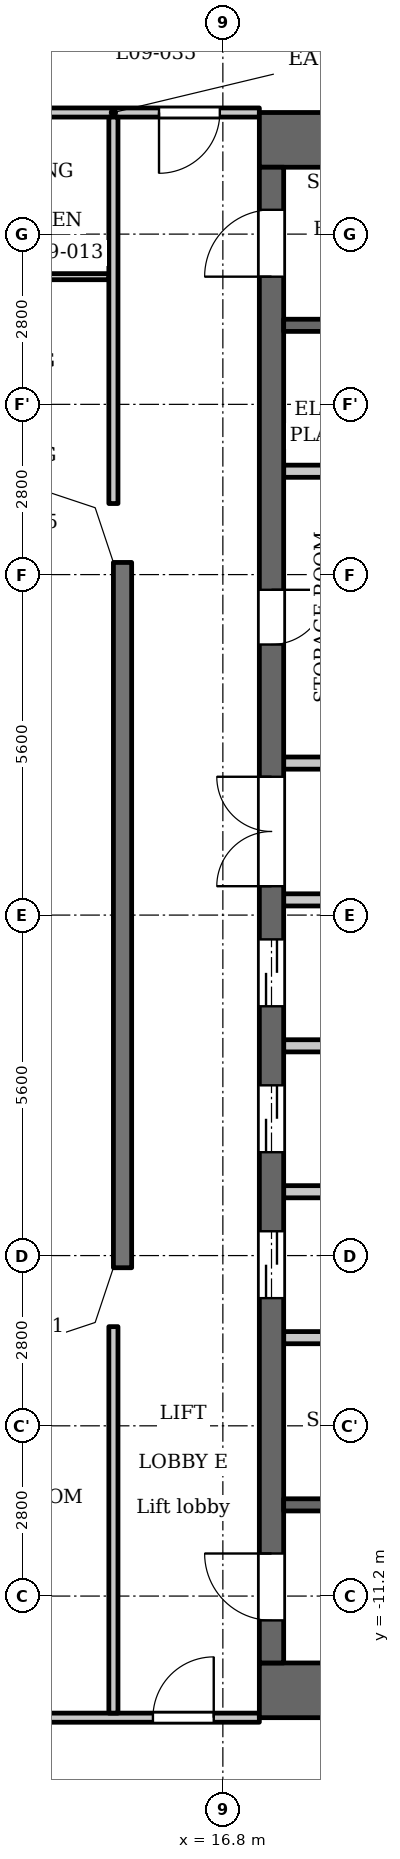
"""IFC4 building model, lengths in metres.
Left out: names, types, materials, properties, quantities, classifications, styles, units other than length and angle.
Written with IfcOpenShell. Run it as: python <this file> out.ifc"""

import sys

from ifc_helpers import new_model, si_unit, direction, frame, frame_2d, origin, place, context, subcontext, project, spatial, polyline, rectangle, outline, extrude, element, fill, save


model = new_model("IFC4")
c1 = context("Model", 3, precision=1e-05, world=origin(), true_north=direction((0.0, 1.0)))
c2 = subcontext(c1, "Body", "Model", "MODEL_VIEW")
j1 = project(units=[si_unit("LENGTHUNIT", "METRE"), si_unit("PLANEANGLEUNIT", "RADIAN")], contexts=[c1])
p1 = place(None, origin())
s1 = spatial("IfcSite", under=j1, at=p1, CompositionType="ELEMENT")
p2 = place(p1, origin())
s2 = spatial("IfcBuilding", under=s1, at=p2, CompositionType="ELEMENT")
p3 = place(p2, frame((0.0, 0.0, 41.0)))
s3 = spatial("IfcBuildingStorey", under=s2, at=p3, CompositionType="ELEMENT", Elevation=41.0)
p4 = place(p3, frame((15.15, 5.8, 0.0), z_axis=(0.0, 0.0, 1.0), x_axis=(0.0, -1.0, 0.0)))
e1 = element("IfcWall", 1, at=p4, inside=s3, PredefinedType="SOLIDWALL", context=c2, shape_type="SweptSolid", body=[
    extrude(rectangle(XDim=11.6, YDim=0.3, at=frame_2d((5.8, 0.0))), origin(), (0.0, 0.0, 1.0), 3.2),
])
for number, where, z_axis, x_axis in (
    (2, (17.4, 12.75, 0.0), (0.0, 0.0, 1.0), (1.0, 0.0, 0.0)),
    (3, (17.4, -12.75, 0.0), (0.0, 0.0, 1.0), (1.0, 0.0, 0.0)),
):
    element("IfcWall", number, at=place(p3, frame(where, z_axis=z_axis, x_axis=x_axis)), inside=s3, PredefinedType="SHEAR", context=c2, shape_type="SweptSolid", body=[
        extrude(rectangle(XDim=10.4, YDim=0.9, at=frame_2d((5.2, 0.0))), origin(), (0.0, 0.0, 1.0), 3.2),
    ])
p5 = place(p3, frame((17.6, -12.3, 0.0), z_axis=(0.0, 0.0, 1.0), x_axis=(0.0, 1.0, 0.0)))
e4 = element("IfcWall", 4, at=p5, inside=s3, PredefinedType="SHEAR", context=c2, shape_type="SweptSolid", body=[
    extrude(rectangle(XDim=24.6, YDim=0.4, at=frame_2d((12.3, 0.0))), origin(), (0.0, 0.0, 1.0), 3.2),
])
p6 = place(p5, frame((6.0, 0.0, 0.0)))
e5 = element("IfcOpeningElement", 5, at=p6, cuts=e4, PredefinedType="OPENING", context=c2, shape_type="SweptSolid", body=[
    extrude(rectangle(XDim=1.1, YDim=2.1, at=frame_2d((0.55, 1.05))), frame((0.0, 0.21, 0.0), z_axis=(0.0, -1.0, 0.0), x_axis=(1.0, 0.0, 0.0)), (0.0, 0.0, 1.0), 0.42),
])
p7 = place(p5, frame((8.4, 0.0, 0.0)))
e6 = element("IfcOpeningElement", 6, at=p7, cuts=e4, PredefinedType="OPENING", context=c2, shape_type="SweptSolid", body=[
    extrude(rectangle(XDim=1.1, YDim=2.1, at=frame_2d((0.55, 1.05))), frame((0.0, 0.21, 0.0), z_axis=(0.0, -1.0, 0.0), x_axis=(1.0, 0.0, 0.0)), (0.0, 0.0, 1.0), 0.42),
])
p8 = place(p5, frame((10.8, 0.0, 0.0)))
e7 = element("IfcOpeningElement", 7, at=p8, cuts=e4, PredefinedType="OPENING", context=c2, shape_type="SweptSolid", body=[
    extrude(rectangle(XDim=1.1, YDim=2.1, at=frame_2d((0.55, 1.05))), frame((0.0, 0.21, 0.0), z_axis=(0.0, -1.0, 0.0), x_axis=(1.0, 0.0, 0.0)), (0.0, 0.0, 1.0), 0.42),
])
p9 = place(p5, frame((16.75, 0.0, 0.0)))
e8 = element("IfcOpeningElement", 8, at=p9, cuts=e4, PredefinedType="OPENING", context=c2, shape_type="SweptSolid", body=[
    extrude(rectangle(XDim=0.9, YDim=2.1, at=frame_2d((0.45, 1.05))), frame((0.0, 0.21, 0.0), z_axis=(0.0, -1.0, 0.0), x_axis=(1.0, 0.0, 0.0)), (0.0, 0.0, 1.0), 0.42),
])
p10 = place(p5, frame((22.8, 0.0, 0.0)))
e9 = element("IfcOpeningElement", 9, at=p10, cuts=e4, PredefinedType="OPENING", context=c2, shape_type="SweptSolid", body=[
    extrude(rectangle(XDim=1.1, YDim=2.1, at=frame_2d((0.55, 1.05))), frame((0.0, 0.21, 0.0), z_axis=(0.0, -1.0, 0.0), x_axis=(1.0, 0.0, 0.0)), (0.0, 0.0, 1.0), 0.42),
])
p11 = place(p5, frame((0.7, 0.0, 0.0)))
e10 = element("IfcOpeningElement", 10, at=p11, cuts=e4, PredefinedType="OPENING", context=c2, shape_type="SweptSolid", body=[
    extrude(rectangle(XDim=1.1, YDim=2.1, at=frame_2d((0.55, 1.05))), frame((0.0, 0.21, 0.0), z_axis=(0.0, -1.0, 0.0), x_axis=(1.0, 0.0, 0.0)), (0.0, 0.0, 1.0), 0.42),
])
p12 = place(p5, frame((12.775, 0.0, 0.0)))
e11 = element("IfcOpeningElement", 11, at=p12, cuts=e4, PredefinedType="OPENING", context=c2, shape_type="SweptSolid", body=[
    extrude(rectangle(XDim=1.8, YDim=2.1, at=frame_2d((0.9, 1.05))), frame((0.0, 0.21, 0.0), z_axis=(0.0, -1.0, 0.0), x_axis=(1.0, 0.0, 0.0)), (0.0, 0.0, 1.0), 0.42),
])
p13 = place(p3, frame((17.8, -9.7, 0.0), z_axis=(0.0, 0.0, 1.0), x_axis=(1.0, 0.0, 0.0)))
e12 = element("IfcWall", 12, at=p13, inside=s3, PredefinedType="SHEAR", context=c2, shape_type="SweptSolid", body=[
    extrude(rectangle(XDim=8.3, YDim=0.2, at=frame_2d((4.15, 0.0))), origin(), (0.0, 0.0, 1.0), 3.2),
])
p14 = place(p13, frame((0.85, 0.0, 0.0)))
e13 = element("IfcOpeningElement", 13, at=p14, cuts=e12, PredefinedType="OPENING", context=c2, shape_type="SweptSolid", body=[
    extrude(rectangle(XDim=1.1, YDim=2.1, at=frame_2d((0.55, 1.05))), frame((0.0, 0.11, 0.0), z_axis=(0.0, -1.0, 0.0), x_axis=(1.0, 0.0, 0.0)), (0.0, 0.0, 1.0), 0.22),
])
p15 = place(p13, frame((3.75, 0.0, 0.0)))
e14 = element("IfcOpeningElement", 14, at=p15, cuts=e12, PredefinedType="OPENING", context=c2, shape_type="SweptSolid", body=[
    extrude(rectangle(XDim=1.1, YDim=2.1, at=frame_2d((0.55, 1.05))), frame((0.0, 0.11, 0.0), z_axis=(0.0, -1.0, 0.0), x_axis=(1.0, 0.0, 0.0)), (0.0, 0.0, 1.0), 0.22),
])
for number, where, z_axis, x_axis in (
    (15, (17.8, -6.95, 0.0), (0.0, 0.0, 1.0), (1.0, 0.0, 0.0)),
    (16, (17.8, -4.55, 0.0), (0.0, 0.0, 1.0), (1.0, 0.0, 0.0)),
    (17, (17.8, -2.15, 0.0), (0.0, 0.0, 1.0), (1.0, 0.0, 0.0)),
):
    element("IfcWall", number, at=place(p3, frame(where, z_axis=z_axis, x_axis=x_axis)), inside=s3, PredefinedType="PARTITIONING", context=c2, shape_type="SweptSolid", body=[
        extrude(rectangle(XDim=2.8, YDim=0.2, at=frame_2d((1.4, 0.0))), origin(), (0.0, 0.0, 1.0), 3.2),
    ])
p16 = place(p3, frame((17.8, 0.25, 0.0), z_axis=(0.0, 0.0, 1.0), x_axis=(1.0, 0.0, 0.0)))
e18 = element("IfcWall", 18, at=p16, inside=s3, PredefinedType="PARTITIONING", context=c2, shape_type="SweptSolid", body=[
    extrude(rectangle(XDim=3.0, YDim=0.2, at=frame_2d((1.5, 0.0))), origin(), (0.0, 0.0, 1.0), 3.2),
])
p17 = place(p3, frame((17.8, 2.5, 0.0), z_axis=(0.0, 0.0, 1.0), x_axis=(1.0, 0.0, 0.0)))
e19 = element("IfcWall", 19, at=p17, inside=s3, PredefinedType="PARTITIONING", context=c2, shape_type="SweptSolid", body=[
    extrude(rectangle(XDim=3.0, YDim=0.2, at=frame_2d((1.5, 0.0))), origin(), (0.0, 0.0, 1.0), 3.2),
])
p18 = place(p17, frame((1.7, 0.0, 0.0)))
e20 = element("IfcOpeningElement", 20, at=p18, cuts=e19, PredefinedType="OPENING", context=c2, shape_type="SweptSolid", body=[
    extrude(rectangle(XDim=0.9, YDim=2.1, at=frame_2d((0.45, 1.05))), frame((0.0, 0.11, 0.0), z_axis=(0.0, -1.0, 0.0), x_axis=(1.0, 0.0, 0.0)), (0.0, 0.0, 1.0), 0.22),
])
p19 = place(p3, frame((17.8, 7.3, 0.0), z_axis=(0.0, 0.0, 1.0), x_axis=(1.0, 0.0, 0.0)))
e21 = element("IfcWall", 21, at=p19, inside=s3, PredefinedType="PARTITIONING", context=c2, shape_type="SweptSolid", body=[
    extrude(rectangle(XDim=2.8, YDim=0.2, at=frame_2d((1.4, 0.0))), origin(), (0.0, 0.0, 1.0), 3.2),
])
p20 = place(p3, frame((17.8, 9.7, 0.0), z_axis=(0.0, 0.0, 1.0), x_axis=(1.0, 0.0, 0.0)))
e22 = element("IfcWall", 22, at=p20, inside=s3, PredefinedType="SHEAR", context=c2, shape_type="SweptSolid", body=[
    extrude(rectangle(XDim=8.3, YDim=0.2, at=frame_2d((4.15, 0.0))), origin(), (0.0, 0.0, 1.0), 3.2),
])
p21 = place(p20, frame((0.85, 0.0, 0.0)))
e23 = element("IfcOpeningElement", 23, at=p21, cuts=e22, PredefinedType="OPENING", context=c2, shape_type="SweptSolid", body=[
    extrude(rectangle(XDim=1.1, YDim=2.1, at=frame_2d((0.55, 1.05))), frame((0.0, 0.11, 0.0), z_axis=(0.0, -1.0, 0.0), x_axis=(1.0, 0.0, 0.0)), (0.0, 0.0, 1.0), 0.22),
])
p22 = place(p20, frame((3.75, 0.0, 0.0)))
e24 = element("IfcOpeningElement", 24, at=p22, cuts=e22, PredefinedType="OPENING", context=c2, shape_type="SweptSolid", body=[
    extrude(rectangle(XDim=1.1, YDim=2.1, at=frame_2d((0.55, 1.05))), frame((0.0, 0.11, 0.0), z_axis=(0.0, -1.0, 0.0), x_axis=(1.0, 0.0, 0.0)), (0.0, 0.0, 1.0), 0.22),
])
p23 = place(p3, frame((-17.4, -13.2, 0.0), z_axis=(0.0, 0.0, 1.0), x_axis=(1.0, 0.0, 0.0)))
e25 = element("IfcWall", 25, at=p23, inside=s3, PredefinedType="PARTITIONING", context=c2, shape_type="SweptSolid", body=[
    extrude(rectangle(XDim=34.8, YDim=0.15, at=frame_2d((17.4, 0.0))), origin(), (0.0, 0.0, 1.0), 3.2),
])
p24 = place(p23, frame((0.65, 0.0, 0.0)))
e26 = element("IfcOpeningElement", 26, at=p24, cuts=e25, PredefinedType="OPENING", context=c2, shape_type="SweptSolid", body=[
    extrude(rectangle(XDim=1.0, YDim=2.1, at=frame_2d((0.5, 1.05))), frame((0.0, 0.085, 0.0), z_axis=(0.0, -1.0, 0.0), x_axis=(1.0, 0.0, 0.0)), (0.0, 0.0, 1.0), 0.17),
])
p25 = place(p23, frame((33.05, 0.0, 0.0)))
e27 = element("IfcOpeningElement", 27, at=p25, cuts=e25, PredefinedType="OPENING", context=c2, shape_type="SweptSolid", body=[
    extrude(rectangle(XDim=1.0, YDim=2.1, at=frame_2d((0.5, 1.05))), frame((0.0, 0.085, 0.0), z_axis=(0.0, -1.0, 0.0), x_axis=(1.0, 0.0, 0.0)), (0.0, 0.0, 1.0), 0.17),
])
p26 = place(p23, frame((4.55, 0.0, 0.0)))
e28 = element("IfcOpeningElement", 28, at=p26, cuts=e25, PredefinedType="OPENING", context=c2, shape_type="SweptSolid", body=[
    extrude(rectangle(XDim=1.0, YDim=2.1, at=frame_2d((0.5, 1.05))), frame((0.0, 0.085, 0.0), z_axis=(0.0, -1.0, 0.0), x_axis=(1.0, 0.0, 0.0)), (0.0, 0.0, 1.0), 0.17),
])
p27 = place(p23, frame((6.9, 0.0, 0.0)))
e29 = element("IfcOpeningElement", 29, at=p27, cuts=e25, PredefinedType="OPENING", context=c2, shape_type="SweptSolid", body=[
    extrude(rectangle(XDim=1.0, YDim=2.1, at=frame_2d((0.5, 1.05))), frame((0.0, 0.085, 0.0), z_axis=(0.0, -1.0, 0.0), x_axis=(1.0, 0.0, 0.0)), (0.0, 0.0, 1.0), 0.17),
])
p28 = place(p23, frame((15.75, 0.0, 0.0)))
e30 = element("IfcOpeningElement", 30, at=p28, cuts=e25, PredefinedType="OPENING", context=c2, shape_type="SweptSolid", body=[
    extrude(rectangle(XDim=1.0, YDim=2.1, at=frame_2d((0.5, 1.05))), frame((0.0, 0.085, 0.0), z_axis=(0.0, -1.0, 0.0), x_axis=(1.0, 0.0, 0.0)), (0.0, 0.0, 1.0), 0.17),
])
p29 = place(p23, frame((18.1, 0.0, 0.0)))
e31 = element("IfcOpeningElement", 31, at=p29, cuts=e25, PredefinedType="OPENING", context=c2, shape_type="SweptSolid", body=[
    extrude(rectangle(XDim=1.0, YDim=2.1, at=frame_2d((0.5, 1.05))), frame((0.0, 0.085, 0.0), z_axis=(0.0, -1.0, 0.0), x_axis=(1.0, 0.0, 0.0)), (0.0, 0.0, 1.0), 0.17),
])
p30 = place(p23, frame((26.95, 0.0, 0.0)))
e32 = element("IfcOpeningElement", 32, at=p30, cuts=e25, PredefinedType="OPENING", context=c2, shape_type="SweptSolid", body=[
    extrude(rectangle(XDim=1.0, YDim=2.1, at=frame_2d((0.5, 1.05))), frame((0.0, 0.085, 0.0), z_axis=(0.0, -1.0, 0.0), x_axis=(1.0, 0.0, 0.0)), (0.0, 0.0, 1.0), 0.17),
])
p31 = place(p23, frame((29.25, 0.0, 0.0)))
e33 = element("IfcOpeningElement", 33, at=p31, cuts=e25, PredefinedType="OPENING", context=c2, shape_type="SweptSolid", body=[
    extrude(rectangle(XDim=1.0, YDim=2.1, at=frame_2d((0.5, 1.05))), frame((0.0, 0.085, 0.0), z_axis=(0.0, -1.0, 0.0), x_axis=(1.0, 0.0, 0.0)), (0.0, 0.0, 1.0), 0.17),
])
p32 = place(p3, frame((-14.925, 10.5, 0.0), z_axis=(0.0, 0.0, 1.0), x_axis=(1.0, 0.0, 0.0)))
e34 = element("IfcWall", 34, at=p32, inside=s3, PredefinedType="PARTITIONING", context=c2, shape_type="SweptSolid", body=[
    extrude(rectangle(XDim=29.85, YDim=0.1, at=frame_2d((14.925, 0.0))), origin(), (0.0, 0.0, 1.0), 3.2),
])
p33 = place(p32, frame((4.375, 0.0, 0.0)))
e35 = element("IfcOpeningElement", 35, at=p33, cuts=e34, PredefinedType="OPENING", context=c2, shape_type="SweptSolid", body=[
    extrude(rectangle(XDim=0.8, YDim=2.1, at=frame_2d((0.4, 1.05))), frame((0.0, 0.06, 0.0), z_axis=(0.0, -1.0, 0.0), x_axis=(1.0, 0.0, 0.0)), (0.0, 0.0, 1.0), 0.12),
])
p34 = place(p32, frame((0.575, 0.0, 0.0)))
e36 = element("IfcOpeningElement", 36, at=p34, cuts=e34, PredefinedType="OPENING", context=c2, shape_type="SweptSolid", body=[
    extrude(rectangle(XDim=0.9, YDim=2.1, at=frame_2d((0.45, 1.05))), frame((0.0, 0.06, 0.0), z_axis=(0.0, -1.0, 0.0), x_axis=(1.0, 0.0, 0.0)), (0.0, 0.0, 1.0), 0.12),
])
p35 = place(p32, frame((13.475, 0.0, 0.0)))
e37 = element("IfcOpeningElement", 37, at=p35, cuts=e34, PredefinedType="OPENING", context=c2, shape_type="SweptSolid", body=[
    extrude(rectangle(XDim=0.8, YDim=2.1, at=frame_2d((0.4, 1.05))), frame((0.0, 0.06, 0.0), z_axis=(0.0, -1.0, 0.0), x_axis=(1.0, 0.0, 0.0)), (0.0, 0.0, 1.0), 0.12),
])
p36 = place(p32, frame((9.975, 0.0, 0.0)))
e38 = element("IfcOpeningElement", 38, at=p36, cuts=e34, PredefinedType="OPENING", context=c2, shape_type="SweptSolid", body=[
    extrude(rectangle(XDim=0.9, YDim=2.1, at=frame_2d((0.45, 1.05))), frame((0.0, 0.06, 0.0), z_axis=(0.0, -1.0, 0.0), x_axis=(1.0, 0.0, 0.0)), (0.0, 0.0, 1.0), 0.12),
])
p37 = place(p32, frame((19.075, 0.0, 0.0)))
e39 = element("IfcOpeningElement", 39, at=p37, cuts=e34, PredefinedType="OPENING", context=c2, shape_type="SweptSolid", body=[
    extrude(rectangle(XDim=0.8, YDim=2.1, at=frame_2d((0.4, 1.05))), frame((0.0, 0.06, 0.0), z_axis=(0.0, -1.0, 0.0), x_axis=(1.0, 0.0, 0.0)), (0.0, 0.0, 1.0), 0.12),
])
p38 = place(p32, frame((16.075, 0.0, 0.0)))
e40 = element("IfcOpeningElement", 40, at=p38, cuts=e34, PredefinedType="OPENING", context=c2, shape_type="SweptSolid", body=[
    extrude(rectangle(XDim=0.9, YDim=2.1, at=frame_2d((0.45, 1.05))), frame((0.0, 0.06, 0.0), z_axis=(0.0, -1.0, 0.0), x_axis=(1.0, 0.0, 0.0)), (0.0, 0.0, 1.0), 0.12),
])
p39 = place(p32, frame((21.175, 0.0, 0.0)))
e41 = element("IfcOpeningElement", 41, at=p39, cuts=e34, PredefinedType="OPENING", context=c2, shape_type="SweptSolid", body=[
    extrude(rectangle(XDim=0.8, YDim=2.1, at=frame_2d((0.4, 1.05))), frame((0.0, 0.06, 0.0), z_axis=(0.0, -1.0, 0.0), x_axis=(1.0, 0.0, 0.0)), (0.0, 0.0, 1.0), 0.12),
])
p40 = place(p32, frame((26.775, 0.0, 0.0)))
e42 = element("IfcOpeningElement", 42, at=p40, cuts=e34, PredefinedType="OPENING", context=c2, shape_type="SweptSolid", body=[
    extrude(rectangle(XDim=0.9, YDim=2.1, at=frame_2d((0.45, 1.05))), frame((0.0, 0.06, 0.0), z_axis=(0.0, -1.0, 0.0), x_axis=(1.0, 0.0, 0.0)), (0.0, 0.0, 1.0), 0.12),
])
p41 = place(p3, frame((-17.4, 13.2, 0.0), z_axis=(0.0, 0.0, 1.0), x_axis=(1.0, 0.0, 0.0)))
e43 = element("IfcWall", 43, at=p41, inside=s3, PredefinedType="PARTITIONING", context=c2, shape_type="SweptSolid", body=[
    extrude(rectangle(XDim=34.8, YDim=0.15, at=frame_2d((17.4, 0.0))), origin(), (0.0, 0.0, 1.0), 3.2),
])
p42 = place(p41, frame((0.75, 0.0, 0.0)))
e44 = element("IfcOpeningElement", 44, at=p42, cuts=e43, PredefinedType="OPENING", context=c2, shape_type="SweptSolid", body=[
    extrude(rectangle(XDim=1.0, YDim=2.1, at=frame_2d((0.5, 1.05))), frame((0.0, 0.085, 0.0), z_axis=(0.0, -1.0, 0.0), x_axis=(1.0, 0.0, 0.0)), (0.0, 0.0, 1.0), 0.17),
])
p43 = place(p41, frame((33.15, 0.0, 0.0)))
e45 = element("IfcOpeningElement", 45, at=p43, cuts=e43, PredefinedType="OPENING", context=c2, shape_type="SweptSolid", body=[
    extrude(rectangle(XDim=1.0, YDim=2.1, at=frame_2d((0.5, 1.05))), frame((0.0, 0.085, 0.0), z_axis=(0.0, -1.0, 0.0), x_axis=(1.0, 0.0, 0.0)), (0.0, 0.0, 1.0), 0.17),
])
p44 = place(p41, frame((3.05, 0.0, 0.0)))
e46 = element("IfcOpeningElement", 46, at=p44, cuts=e43, PredefinedType="OPENING", context=c2, shape_type="SweptSolid", body=[
    extrude(rectangle(XDim=1.0, YDim=2.1, at=frame_2d((0.5, 1.05))), frame((0.0, 0.085, 0.0), z_axis=(0.0, -1.0, 0.0), x_axis=(1.0, 0.0, 0.0)), (0.0, 0.0, 1.0), 0.17),
])
p45 = place(p41, frame((12.45, 0.0, 0.0)))
e47 = element("IfcOpeningElement", 47, at=p45, cuts=e43, PredefinedType="OPENING", context=c2, shape_type="SweptSolid", body=[
    extrude(rectangle(XDim=1.0, YDim=2.1, at=frame_2d((0.5, 1.05))), frame((0.0, 0.085, 0.0), z_axis=(0.0, -1.0, 0.0), x_axis=(1.0, 0.0, 0.0)), (0.0, 0.0, 1.0), 0.17),
])
p46 = place(p41, frame((18.3, 0.0, 0.0)))
e48 = element("IfcOpeningElement", 48, at=p46, cuts=e43, PredefinedType="OPENING", context=c2, shape_type="SweptSolid", body=[
    extrude(rectangle(XDim=1.0, YDim=2.1, at=frame_2d((0.5, 1.05))), frame((0.0, 0.085, 0.0), z_axis=(0.0, -1.0, 0.0), x_axis=(1.0, 0.0, 0.0)), (0.0, 0.0, 1.0), 0.17),
])
p47 = place(p41, frame((29.25, 0.0, 0.0)))
e49 = element("IfcOpeningElement", 49, at=p47, cuts=e43, PredefinedType="OPENING", context=c2, shape_type="SweptSolid", body=[
    extrude(rectangle(XDim=1.0, YDim=2.1, at=frame_2d((0.5, 1.05))), frame((0.0, 0.085, 0.0), z_axis=(0.0, -1.0, 0.0), x_axis=(1.0, 0.0, 0.0)), (0.0, 0.0, 1.0), 0.17),
])
for number, where, z_axis, x_axis in (
    (50, (15.0, -13.125, 0.0), (0.0, 0.0, 1.0), (0.0, 1.0, 0.0)),
    (51, (15.0, 6.769, 0.0), (0.0, 0.0, 1.0), (0.0, 1.0, 0.0)),
):
    element("IfcWall", number, at=place(p3, frame(where, z_axis=z_axis, x_axis=x_axis)), inside=s3, PredefinedType="PARTITIONING", context=c2, shape_type="SweptSolid", body=[
        extrude(rectangle(XDim=6.356, YDim=0.15, at=frame_2d((3.178, 0.0))), origin(), (0.0, 0.0, 1.0), 3.2),
    ])
p48 = place(p3, origin())
e52 = element("IfcWall", 52, at=p48, inside=s3, PredefinedType="SOLIDWALL", context=c2, shape_type="SweptSolid", body=[
    extrude(outline(polyline([(14.937, 6.937), (13.849, 7.3), (13.8, 7.3), (13.8, 7.0), (14.7, 6.7), (15.0, 5.8), (15.3, 5.8), (15.3, 5.849), (14.937, 6.937)])), origin(), (0.0, 0.0, 1.0), 3.2),
])
e53 = element("IfcWall", 53, at=p48, inside=s3, PredefinedType="SOLIDWALL", context=c2, shape_type="SweptSolid", body=[
    extrude(outline(polyline([(14.937, -6.937), (15.3, -5.849), (15.3, -5.8), (15.0, -5.8), (14.7, -6.7), (13.8, -7.0), (13.8, -7.3), (13.849, -7.3), (14.937, -6.937)])), origin(), (0.0, 0.0, 1.0), 3.2),
])
p49 = place(p6, origin())
e54 = element("IfcDoor", 54, at=p49, inside=s3, OperationType="DOUBLE_DOOR_SLIDING", PredefinedType="DOOR", context=c2, shape_type="SweptSolid", body=[
    extrude(rectangle(XDim=1.1, YDim=2.1, at=frame_2d((0.55, 1.05))), frame((0.0, 0.025, 0.0), z_axis=(0.0, -1.0, 0.0), x_axis=(1.0, 0.0, 0.0)), (0.0, 0.0, 1.0), 0.05),
])
fill(e5, e54)
p50 = place(p7, origin())
e55 = element("IfcDoor", 55, at=p50, inside=s3, OperationType="DOUBLE_DOOR_SLIDING", PredefinedType="DOOR", context=c2, shape_type="SweptSolid", body=[
    extrude(rectangle(XDim=1.1, YDim=2.1, at=frame_2d((0.55, 1.05))), frame((0.0, 0.025, 0.0), z_axis=(0.0, -1.0, 0.0), x_axis=(1.0, 0.0, 0.0)), (0.0, 0.0, 1.0), 0.05),
])
fill(e6, e55)
p51 = place(p8, origin())
e56 = element("IfcDoor", 56, at=p51, inside=s3, OperationType="DOUBLE_DOOR_SLIDING", PredefinedType="DOOR", context=c2, shape_type="SweptSolid", body=[
    extrude(rectangle(XDim=1.1, YDim=2.1, at=frame_2d((0.55, 1.05))), frame((0.0, 0.025, 0.0), z_axis=(0.0, -1.0, 0.0), x_axis=(1.0, 0.0, 0.0)), (0.0, 0.0, 1.0), 0.05),
])
fill(e7, e56)
p52 = place(p9, origin())
e57 = element("IfcDoor", 57, at=p52, inside=s3, OperationType="SINGLE_SWING_RIGHT", PredefinedType="DOOR", context=c2, shape_type="SweptSolid", body=[
    extrude(rectangle(XDim=0.9, YDim=2.1, at=frame_2d((0.45, 1.05))), frame((0.0, 0.025, 0.0), z_axis=(0.0, -1.0, 0.0), x_axis=(1.0, 0.0, 0.0)), (0.0, 0.0, 1.0), 0.05),
])
fill(e8, e57)
p53 = place(p10, origin())
e58 = element("IfcDoor", 58, at=p53, inside=s3, OperationType="SINGLE_SWING_RIGHT", PredefinedType="DOOR", context=c2, shape_type="SweptSolid", body=[
    extrude(rectangle(XDim=1.1, YDim=2.1, at=frame_2d((0.55, 1.05))), frame((0.0, 0.025, 0.0), z_axis=(0.0, -1.0, 0.0), x_axis=(1.0, 0.0, 0.0)), (0.0, 0.0, 1.0), 0.05),
])
fill(e9, e58)
p54 = place(p11, origin())
e59 = element("IfcDoor", 59, at=p54, inside=s3, OperationType="SINGLE_SWING_LEFT", PredefinedType="DOOR", context=c2, shape_type="SweptSolid", body=[
    extrude(rectangle(XDim=1.1, YDim=2.1, at=frame_2d((0.55, 1.05))), frame((0.0, 0.025, 0.0), z_axis=(0.0, -1.0, 0.0), x_axis=(1.0, 0.0, 0.0)), (0.0, 0.0, 1.0), 0.05),
])
fill(e10, e59)
p55 = place(p12, origin())
e60 = element("IfcDoor", 60, at=p55, inside=s3, OperationType="DOUBLE_DOOR_SINGLE_SWING", PredefinedType="DOOR", context=c2, shape_type="SweptSolid", body=[
    extrude(rectangle(XDim=1.8, YDim=2.1, at=frame_2d((0.9, 1.05))), frame((0.0, 0.025, 0.0), z_axis=(0.0, -1.0, 0.0), x_axis=(1.0, 0.0, 0.0)), (0.0, 0.0, 1.0), 0.05),
])
fill(e11, e60)
p56 = place(p43, origin())
e61 = element("IfcDoor", 61, at=p56, inside=s3, OperationType="SINGLE_SWING_LEFT", PredefinedType="DOOR", context=c2, shape_type="SweptSolid", body=[
    extrude(rectangle(XDim=1.0, YDim=2.1, at=frame_2d((0.5, 1.05))), frame((0.0, 0.025, 0.0), z_axis=(0.0, -1.0, 0.0), x_axis=(1.0, 0.0, 0.0)), (0.0, 0.0, 1.0), 0.05),
])
fill(e45, e61)
p57 = place(p25, origin())
e62 = element("IfcDoor", 62, at=p57, inside=s3, OperationType="SINGLE_SWING_LEFT", PredefinedType="DOOR", context=c2, shape_type="SweptSolid", body=[
    extrude(rectangle(XDim=1.0, YDim=2.1, at=frame_2d((0.5, 1.05))), frame((0.0, 0.025, 0.0), z_axis=(0.0, -1.0, 0.0), x_axis=(1.0, 0.0, 0.0)), (0.0, 0.0, 1.0), 0.05),
])
fill(e27, e62)
save(model, sys.argv[1])
